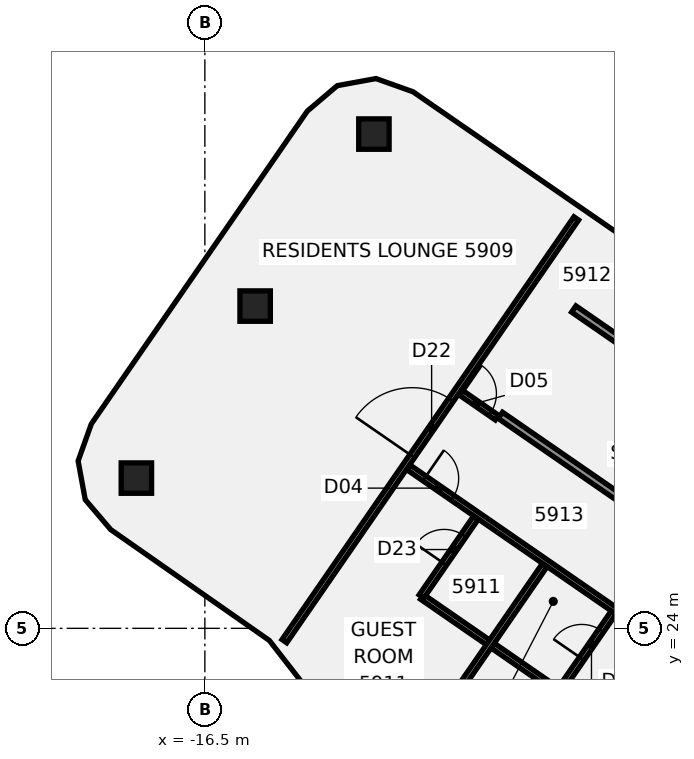
"""IFC4 building model, lengths in metres.
Left out: names, types, materials, properties, quantities, classifications, styles, units other than length and angle.
Written with IfcOpenShell. Run it as: python <this file> out.ifc"""

import sys

from ifc_helpers import new_model, si_unit, direction, frame, frame_2d, origin, origin_2d, place, context, subcontext, project, spatial, polyline, rectangle, outline, extrude, element, fill, save


model = new_model("IFC4")
c1 = context("Model", 3, precision=1e-05, world=origin(), true_north=direction((0.0, 1.0)))
c2 = subcontext(c1, "Body", "Model", "MODEL_VIEW")
j1 = project(units=[si_unit("LENGTHUNIT", "METRE"), si_unit("PLANEANGLEUNIT", "RADIAN")], contexts=[c1])
p1 = place(None, origin())
s1 = spatial("IfcSite", under=j1, at=p1, CompositionType="ELEMENT")
p2 = place(p1, origin())
s2 = spatial("IfcBuilding", under=s1, at=p2, CompositionType="ELEMENT")
p3 = place(p2, frame((0.0, 0.0, 234.3)))
s3 = spatial("IfcBuildingStorey", under=s2, at=p3, CompositionType="ELEMENT", Elevation=234.3)
p4 = place(p3, frame((-9.955, 22.19, -0.139), z_axis=(-0.000474424421, -0.050356763522, 0.998731180693), x_axis=(0.5677282831, 0.822157981301, 0.041723498785)))
e1 = element("IfcColumn", 1, at=p4, inside=s3, PredefinedType="COLUMN", context=c2, shape_type="SweptSolid", body=[
    extrude(rectangle(XDim=0.8, YDim=0.8, at=origin_2d()), origin(), (0.0, 0.0, 1.0), 3.602),
])
p5 = place(p3, frame((-12.052, 37.005, -0.138), z_axis=(0.00573264207, -0.114855169943, 0.993365706451), x_axis=(0.568378702485, 0.817689858134, 0.091263061898)))
e2 = element("IfcColumn", 2, at=p5, inside=s3, PredefinedType="COLUMN", context=c2, shape_type="SweptSolid", body=[
    extrude(rectangle(XDim=0.8, YDim=0.8, at=origin_2d()), origin(), (0.0, 0.0, 1.0), 3.62),
])
p6 = place(p3, frame((-15.177, 32.479, -0.138), z_axis=(0.028532286453, -0.13007761725, 0.991093195477), x_axis=(0.56971014122, 0.816814052479, 0.090802856027)))
e3 = element("IfcColumn", 3, at=p6, inside=s3, PredefinedType="COLUMN", context=c2, shape_type="SweptSolid", body=[
    extrude(rectangle(XDim=0.8, YDim=0.8, at=origin_2d()), origin(), (0.0, 0.0, 1.0), 3.628),
])
p7 = place(p3, frame((-18.302, 27.954, -0.138), z_axis=(0.051322892604, -0.145112963009, 0.988083087934), x_axis=(0.570260507735, 0.816486632962, 0.09029137009)))
e4 = element("IfcColumn", 4, at=p7, inside=s3, PredefinedType="COLUMN", context=c2, shape_type="SweptSolid", body=[
    extrude(rectangle(XDim=0.8, YDim=0.8, at=origin_2d()), origin(), (0.0, 0.0, 1.0), 3.639),
])
p8 = place(p3, frame((-11.149, 28.24, 0.0), z_axis=(0.0, 0.0, 1.0), x_axis=(0.822911999703, -0.568168848798, 0.0)))
e5 = element("IfcWall", 5, at=p8, inside=s3, PredefinedType="PARTITIONING", context=c2, shape_type="SweptSolid", body=[
    extrude(rectangle(XDim=8.82, YDim=0.15, at=frame_2d((4.41, 0.0))), origin(), (0.0, 0.0, 1.0), 2.864),
])
p9 = place(p8, frame((7.071, 0.0, 0.0)))
e6 = element("IfcOpeningElement", 6, at=p9, cuts=e5, PredefinedType="OPENING", context=c2, shape_type="SweptSolid", body=[
    extrude(rectangle(XDim=0.9, YDim=2.1, at=frame_2d((0.45, 1.05))), frame((0.0, 0.085, 0.0), z_axis=(0.0, -1.0, 0.0), x_axis=(1.0, 0.0, 0.0)), (0.0, 0.0, 1.0), 0.17),
])
p10 = place(p8, frame((0.52, 0.0, 0.0)))
e7 = element("IfcOpeningElement", 7, at=p10, cuts=e5, PredefinedType="OPENING", context=c2, shape_type="SweptSolid", body=[
    extrude(rectangle(XDim=0.9, YDim=2.1, at=frame_2d((0.45, 1.05))), frame((0.0, 0.085, 0.0), z_axis=(0.0, -1.0, 0.0), x_axis=(1.0, 0.0, 0.0)), (0.0, 0.0, 1.0), 0.17),
])
p11 = place(p3, frame((-10.782, 24.828, 0.0), z_axis=(0.0, 0.0, 1.0), x_axis=(0.822836909999, -0.568277590217, 0.0)))
e8 = element("IfcWall", 8, at=p11, inside=s3, PredefinedType="PARTITIONING", context=c2, shape_type="SweptSolid", body=[
    extrude(rectangle(XDim=4.304, YDim=0.15, at=frame_2d((2.152, 0.0))), origin(), (0.0, 0.0, 1.0), 2.864),
])
p12 = place(p3, frame((-9.785, 30.216, 0.0), z_axis=(0.0, 0.0, 1.0), x_axis=(0.82280245834, -0.568327471225, 0.0)))
e9 = element("IfcWall", 9, at=p12, inside=s3, PredefinedType="PARTITIONING", context=c2, shape_type="SweptSolid", body=[
    extrude(rectangle(XDim=1.18, YDim=0.15, at=frame_2d((0.59, 0.0))), origin(), (0.0, 0.0, 1.0), 2.864),
])
p13 = place(p12, frame((0.07, 0.0, 0.0)))
e10 = element("IfcOpeningElement", 10, at=p13, cuts=e9, PredefinedType="OPENING", context=c2, shape_type="SweptSolid", body=[
    extrude(rectangle(XDim=0.9, YDim=2.1, at=frame_2d((0.45, 1.05))), frame((0.0, 0.085, 0.0), z_axis=(0.0, -1.0, 0.0), x_axis=(1.0, 0.0, 0.0)), (0.0, 0.0, 1.0), 0.17),
])
p14 = place(p3, frame((-14.407, 23.663, 0.0), z_axis=(0.0, 0.0, 1.0), x_axis=(0.568214013038, 0.822880814813, 0.0)))
e11 = element("IfcWall", 11, at=p14, inside=s3, PredefinedType="PARTITIONING", context=c2, shape_type="SweptSolid", body=[
    extrude(rectangle(XDim=13.517, YDim=0.15, at=frame_2d((6.759, 0.0))), origin(), (0.0, 0.0, 1.0), 2.864),
])
p15 = place(p14, frame((5.918, 0.0, 0.0)))
e12 = element("IfcOpeningElement", 12, at=p15, cuts=e11, PredefinedType="OPENING", context=c2, shape_type="SweptSolid", body=[
    extrude(rectangle(XDim=1.8, YDim=2.1, at=frame_2d((0.9, 1.05))), frame((0.0, 0.085, 0.0), z_axis=(0.0, -1.0, 0.0), x_axis=(1.0, 0.0, 0.0)), (0.0, 0.0, 1.0), 0.17),
])
p16 = place(p3, frame((-9.722, 22.527, 0.0), z_axis=(0.0, 0.0, 1.0), x_axis=(0.568183486807, 0.822901892889, 0.0)))
e13 = element("IfcWall", 13, at=p16, inside=s3, PredefinedType="PARTITIONING", context=c2, shape_type="SweptSolid", body=[
    extrude(rectangle(XDim=3.811, YDim=0.15, at=frame_2d((1.905, 0.0))), origin(), (0.0, 0.0, 1.0), 2.864),
])
p17 = place(p3, frame((-10.799, 24.839, 0.0), z_axis=(0.0, 0.0, 1.0), x_axis=(0.568086063137, 0.822969151833, 0.0)))
e14 = element("IfcWall", 14, at=p17, inside=s3, PredefinedType="PARTITIONING", context=c2, shape_type="SweptSolid", body=[
    extrude(rectangle(XDim=2.52, YDim=0.15, at=frame_2d((1.26, 0.0))), origin(), (0.0, 0.0, 1.0), 2.864),
])
p18 = place(p17, frame((1.05, 0.0, 0.0)))
e15 = element("IfcOpeningElement", 15, at=p18, cuts=e14, PredefinedType="OPENING", context=c2, shape_type="SweptSolid", body=[
    extrude(rectangle(XDim=0.9, YDim=2.1, at=frame_2d((0.45, 1.05))), frame((0.0, 0.085, 0.0), z_axis=(0.0, -1.0, 0.0), x_axis=(1.0, 0.0, 0.0)), (0.0, 0.0, 1.0), 0.17),
])
p19 = place(p3, frame((-7.179, 22.339, 0.0), z_axis=(0.0, 0.0, 1.0), x_axis=(0.568282852212, 0.822833275872, 0.0)))
e16 = element("IfcWall", 16, at=p19, inside=s3, PredefinedType="PARTITIONING", context=c2, shape_type="SweptSolid", body=[
    extrude(rectangle(XDim=2.521, YDim=0.15, at=frame_2d((1.26, 0.0))), origin(), (0.0, 0.0, 1.0), 2.864),
])
p20 = place(p19, frame((1.05, 0.0, 0.0)))
e17 = element("IfcOpeningElement", 17, at=p20, cuts=e16, PredefinedType="OPENING", context=c2, shape_type="SweptSolid", body=[
    extrude(rectangle(XDim=0.9, YDim=2.1, at=frame_2d((0.45, 1.05))), frame((0.0, 0.085, 0.0), z_axis=(0.0, -1.0, 0.0), x_axis=(1.0, 0.0, 0.0)), (0.0, 0.0, 1.0), 0.17),
])
p21 = place(p3, frame((-3.211, 25.797, -0.14), z_axis=(0.0, 0.0, 1.0), x_axis=(-0.822880268837, 0.568214803713, 0.0)))
e18 = element("IfcWall", 18, at=p21, inside=s3, PredefinedType="SHEAR", context=c2, shape_type="SweptSolid", body=[
    extrude(rectangle(XDim=6.7, YDim=0.2, at=frame_2d((3.35, 0.0))), origin(), (0.0, 0.0, 1.0), 3.004),
])
p22 = place(p21, frame((0.35, 0.0, 0.0)))
e19 = element("IfcOpeningElement", 19, at=p22, cuts=e18, PredefinedType="OPENING", context=c2, shape_type="SweptSolid", body=[
    extrude(rectangle(XDim=1.0, YDim=2.1, at=frame_2d((0.5, 1.05))), frame((0.0, 0.11, 0.0), z_axis=(0.0, -1.0, 0.0), x_axis=(1.0, 0.0, 0.0)), (0.0, 0.0, 1.0), 0.22),
])
p23 = place(p3, frame((-1.279, 28.595, -0.14), z_axis=(0.0, 0.0, 1.0), x_axis=(-0.822868503628, 0.568231841537, 0.0)))
e20 = element("IfcWall", 20, at=p23, inside=s3, PredefinedType="SHEAR", context=c2, shape_type="SweptSolid", body=[
    extrude(rectangle(XDim=6.7, YDim=0.2, at=frame_2d((3.35, 0.0))), origin(), (0.0, 0.0, 1.0), 3.004),
])
p24 = place(p3, frame((0.0, 0.0, -0.14)))
e21 = element("IfcWall", 21, at=p24, inside=s3, PredefinedType="SHEAR", context=c2, shape_type="SweptSolid", body=[
    extrude(outline(polyline([(-6.685, 32.206), (-6.849, 32.32), (-8.668, 29.687), (-8.503, 29.573), (-6.685, 32.206)])), origin(), (0.0, 0.0, 1.0), 3.004),
])
p25 = place(p10, frame((0.9, 0.0, 0.0), z_axis=(0.0, 0.0, 1.0), x_axis=(-1.0, 0.0, 0.0)))
e22 = element("IfcDoor", 22, at=p25, inside=s3, OperationType="SINGLE_SWING_LEFT", PredefinedType="DOOR", context=c2, shape_type="SweptSolid", body=[
    extrude(rectangle(XDim=0.9, YDim=2.1, at=frame_2d((0.45, 1.05))), frame((0.0, 0.025, 0.0), z_axis=(0.0, -1.0, 0.0), x_axis=(1.0, 0.0, 0.0)), (0.0, 0.0, 1.0), 0.05),
])
fill(e7, e22)
p26 = place(p13, origin())
e23 = element("IfcDoor", 23, at=p26, inside=s3, OperationType="SINGLE_SWING_RIGHT", PredefinedType="DOOR", context=c2, shape_type="SweptSolid", body=[
    extrude(rectangle(XDim=0.9, YDim=2.1, at=frame_2d((0.45, 1.05))), frame((0.0, 0.025, 0.0), z_axis=(0.0, -1.0, 0.0), x_axis=(1.0, 0.0, 0.0)), (0.0, 0.0, 1.0), 0.05),
])
fill(e10, e23)
p27 = place(p15, origin())
e24 = element("IfcDoor", 24, at=p27, inside=s3, OperationType="DOUBLE_DOOR_SINGLE_SWING", PredefinedType="DOOR", context=c2, shape_type="SweptSolid", body=[
    extrude(rectangle(XDim=1.8, YDim=2.1, at=frame_2d((0.9, 1.05))), frame((0.0, 0.025, 0.0), z_axis=(0.0, -1.0, 0.0), x_axis=(1.0, 0.0, 0.0)), (0.0, 0.0, 1.0), 0.05),
])
fill(e12, e24)
p28 = place(p18, frame((0.9, 0.0, 0.0), z_axis=(0.0, 0.0, 1.0), x_axis=(-1.0, 0.0, 0.0)))
e25 = element("IfcDoor", 25, at=p28, inside=s3, OperationType="SINGLE_SWING_RIGHT", PredefinedType="DOOR", context=c2, shape_type="SweptSolid", body=[
    extrude(rectangle(XDim=0.9, YDim=2.1, at=frame_2d((0.45, 1.05))), frame((0.0, 0.025, 0.0), z_axis=(0.0, -1.0, 0.0), x_axis=(1.0, 0.0, 0.0)), (0.0, 0.0, 1.0), 0.05),
])
fill(e15, e25)
p29 = place(p20, origin())
e26 = element("IfcDoor", 26, at=p29, inside=s3, OperationType="SINGLE_SWING_LEFT", PredefinedType="DOOR", context=c2, shape_type="SweptSolid", body=[
    extrude(rectangle(XDim=0.9, YDim=2.1, at=frame_2d((0.45, 1.05))), frame((0.0, 0.025, 0.0), z_axis=(0.0, -1.0, 0.0), x_axis=(1.0, 0.0, 0.0)), (0.0, 0.0, 1.0), 0.05),
])
fill(e17, e26)
save(model, sys.argv[1])
